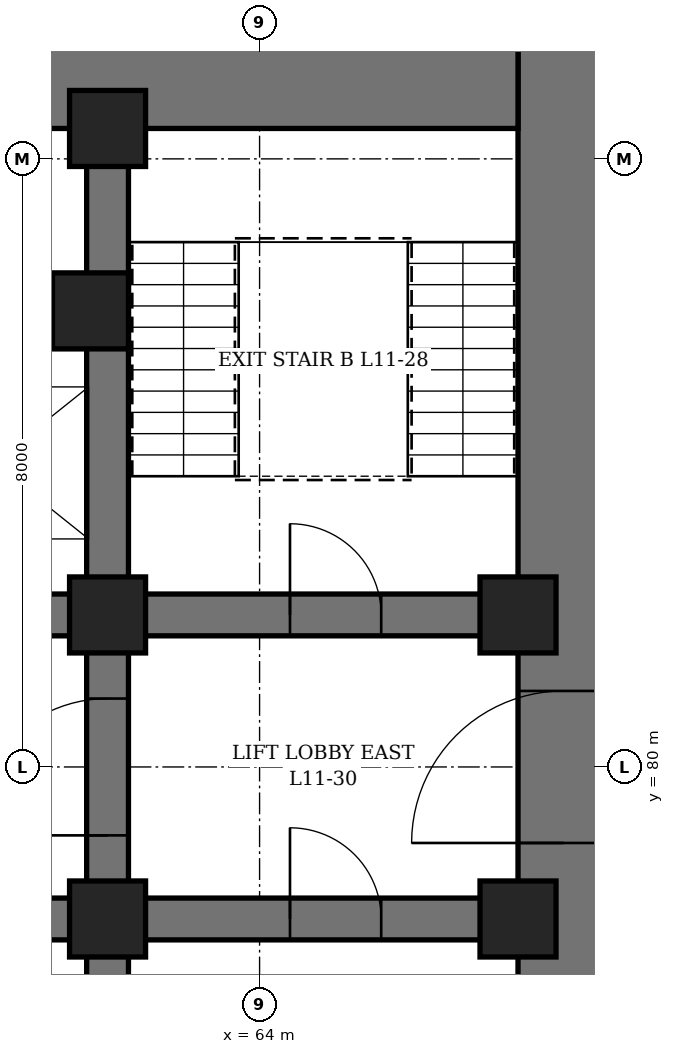
"""IFC4 building model, lengths in metres.
Left out: names, types, materials, properties, quantities, classifications, styles, units other than length and angle.
Written with IfcOpenShell. Run it as: python <this file> out.ifc"""

import sys

from ifc_helpers import new_model, si_unit, direction, frame, frame_2d, origin, origin_2d, place, context, subcontext, project, spatial, rectangle, hollow_rectangle, extrude, element, fill, save


model = new_model("IFC4")
c1 = context("Model", 3, precision=1e-05, world=origin(), true_north=direction((0.0, 1.0)))
c2 = subcontext(c1, "Body", "Model", "MODEL_VIEW")
j1 = project(units=[si_unit("LENGTHUNIT", "METRE"), si_unit("PLANEANGLEUNIT", "RADIAN")], contexts=[c1])
p1 = place(None, origin())
s1 = spatial("IfcSite", under=j1, at=p1, CompositionType="ELEMENT")
p2 = place(p1, origin())
s2 = spatial("IfcBuilding", under=s1, at=p2, CompositionType="ELEMENT")
p3 = place(p2, frame((0.0, 0.0, 55.9)))
s3 = spatial("IfcBuildingStorey", under=s2, at=p3, CompositionType="ELEMENT", Elevation=55.9)
p4 = place(p3, frame((68.0, 70.4, 0.0), z_axis=(0.0, 0.0, 1.0), x_axis=(0.0, 1.0, 0.0)))
e1 = element("IfcWall", 1, at=p4, inside=s3, PredefinedType="SHEAR", context=c2, shape_type="SweptSolid", body=[
    extrude(rectangle(XDim=19.2, YDim=1.2, at=frame_2d((9.6, 0.0))), origin(), (0.0, 0.0, 1.0), 4.2),
])
p5 = place(p4, frame((8.6, 0.0, 0.0)))
e2 = element("IfcOpeningElement", 2, at=p5, cuts=e1, PredefinedType="OPENING", context=c2, shape_type="SweptSolid", body=[
    extrude(rectangle(XDim=2.0, YDim=2.4, at=frame_2d((1.0, 1.2))), frame((0.0, 0.61, 0.0), z_axis=(0.0, -1.0, 0.0), x_axis=(1.0, 0.0, 0.0)), (0.0, 0.0, 1.0), 1.22),
])
p6 = place(p3, frame((44.6, 89.0, 0.0), z_axis=(0.0, 0.0, 1.0), x_axis=(1.0, 0.0, 0.0)))
e3 = element("IfcWall", 3, at=p6, inside=s3, PredefinedType="SHEAR", context=c2, shape_type="SweptSolid", body=[
    extrude(rectangle(XDim=22.8, YDim=1.2, at=frame_2d((11.4, 0.0))), origin(), (0.0, 0.0, 1.0), 4.2),
])
p7 = place(p6, frame((6.575, 0.0, 0.0)))
e4 = element("IfcOpeningElement", 4, at=p7, cuts=e3, PredefinedType="OPENING", context=c2, shape_type="SweptSolid", body=[
    extrude(rectangle(XDim=1.0, YDim=2.1, at=frame_2d((0.5, 1.05))), frame((0.0, 0.61, 0.0), z_axis=(0.0, -1.0, 0.0), x_axis=(1.0, 0.0, 0.0)), (0.0, 0.0, 1.0), 1.22),
])
p8 = place(p6, frame((9.45, 0.0, 0.0)))
e5 = element("IfcOpeningElement", 5, at=p8, cuts=e3, PredefinedType="OPENING", context=c2, shape_type="SweptSolid", body=[
    extrude(rectangle(XDim=0.9, YDim=2.1, at=frame_2d((0.45, 1.05))), frame((0.0, 0.61, 0.0), z_axis=(0.0, -1.0, 0.0), x_axis=(1.0, 0.0, 0.0)), (0.0, 0.0, 1.0), 1.22),
])
p9 = place(p6, frame((13.038, 0.0, 0.0)))
e6 = element("IfcOpeningElement", 6, at=p9, cuts=e3, PredefinedType="OPENING", context=c2, shape_type="SweptSolid", body=[
    extrude(rectangle(XDim=0.9, YDim=2.1, at=frame_2d((0.45, 1.05))), frame((0.0, 0.61, 0.0), z_axis=(0.0, -1.0, 0.0), x_axis=(1.0, 0.0, 0.0)), (0.0, 0.0, 1.0), 1.22),
])
p10 = place(p3, frame((62.0, 71.6, 0.0), z_axis=(0.0, 0.0, 1.0), x_axis=(0.0, 1.0, 0.0)))
e7 = element("IfcWall", 7, at=p10, inside=s3, PredefinedType="SHEAR", context=c2, shape_type="SweptSolid", body=[
    extrude(rectangle(XDim=16.8, YDim=0.55, at=frame_2d((8.4, 0.0))), origin(), (0.0, 0.0, 1.0), 4.2),
])
p11 = place(p10, frame((7.5, 0.0, 0.0)))
e8 = element("IfcOpeningElement", 8, at=p11, cuts=e7, PredefinedType="OPENING", context=c2, shape_type="SweptSolid", body=[
    extrude(rectangle(XDim=1.8, YDim=2.4, at=frame_2d((0.9, 1.2))), frame((0.0, 0.285, 0.0), z_axis=(0.0, -1.0, 0.0), x_axis=(1.0, 0.0, 0.0)), (0.0, 0.0, 1.0), 0.57),
])
p12 = place(p3, frame((62.275, 78.0, 0.0), z_axis=(0.0, 0.0, 1.0), x_axis=(1.0, 0.0, 0.0)))
e9 = element("IfcWall", 9, at=p12, inside=s3, PredefinedType="SHEAR", context=c2, shape_type="SweptSolid", body=[
    extrude(rectangle(XDim=5.125, YDim=0.55, at=frame_2d((2.562, 0.0))), origin(), (0.0, 0.0, 1.0), 4.2),
])
p13 = place(p12, frame((2.125, 0.0, 0.0)))
e10 = element("IfcOpeningElement", 10, at=p13, cuts=e9, PredefinedType="OPENING", context=c2, shape_type="SweptSolid", body=[
    extrude(rectangle(XDim=1.2, YDim=2.1, at=frame_2d((0.6, 1.05))), frame((0.0, 0.285, 0.0), z_axis=(0.0, -1.0, 0.0), x_axis=(1.0, 0.0, 0.0)), (0.0, 0.0, 1.0), 0.57),
])
p14 = place(p3, frame((62.275, 82.0, 0.0), z_axis=(0.0, 0.0, 1.0), x_axis=(1.0, 0.0, 0.0)))
e11 = element("IfcWall", 11, at=p14, inside=s3, PredefinedType="SHEAR", context=c2, shape_type="SweptSolid", body=[
    extrude(rectangle(XDim=5.125, YDim=0.55, at=frame_2d((2.562, 0.0))), origin(), (0.0, 0.0, 1.0), 4.2),
])
p15 = place(p14, frame((2.125, 0.0, 0.0)))
e12 = element("IfcOpeningElement", 12, at=p15, cuts=e11, PredefinedType="OPENING", context=c2, shape_type="SweptSolid", body=[
    extrude(rectangle(XDim=1.2, YDim=2.1, at=frame_2d((0.6, 1.05))), frame((0.0, 0.285, 0.0), z_axis=(0.0, -1.0, 0.0), x_axis=(1.0, 0.0, 0.0)), (0.0, 0.0, 1.0), 0.57),
])
p16 = place(p3, frame((50.275, 78.0, 0.0), z_axis=(0.0, 0.0, 1.0), x_axis=(1.0, 0.0, 0.0)))
e13 = element("IfcWall", 13, at=p16, inside=s3, PredefinedType="SHEAR", context=c2, shape_type="SweptSolid", body=[
    extrude(rectangle(XDim=11.45, YDim=0.55, at=frame_2d((5.725, 0.0))), origin(), (0.0, 0.0, 1.0), 4.2),
])
p17 = place(p16, frame((0.675, 0.0, 0.0)))
e14 = element("IfcOpeningElement", 14, at=p17, cuts=e13, PredefinedType="OPENING", context=c2, shape_type="SweptSolid", body=[
    extrude(rectangle(XDim=1.1, YDim=2.2, at=frame_2d((0.55, 1.1))), frame((0.0, 0.285, 0.0), z_axis=(0.0, -1.0, 0.0), x_axis=(1.0, 0.0, 0.0)), (0.0, 0.0, 1.0), 0.57),
])
p18 = place(p16, frame((3.675, 0.0, 0.0)))
e15 = element("IfcOpeningElement", 15, at=p18, cuts=e13, PredefinedType="OPENING", context=c2, shape_type="SweptSolid", body=[
    extrude(rectangle(XDim=1.1, YDim=2.2, at=frame_2d((0.55, 1.1))), frame((0.0, 0.285, 0.0), z_axis=(0.0, -1.0, 0.0), x_axis=(1.0, 0.0, 0.0)), (0.0, 0.0, 1.0), 0.57),
])
p19 = place(p16, frame((6.675, 0.0, 0.0)))
e16 = element("IfcOpeningElement", 16, at=p19, cuts=e13, PredefinedType="OPENING", context=c2, shape_type="SweptSolid", body=[
    extrude(rectangle(XDim=1.1, YDim=2.2, at=frame_2d((0.55, 1.1))), frame((0.0, 0.285, 0.0), z_axis=(0.0, -1.0, 0.0), x_axis=(1.0, 0.0, 0.0)), (0.0, 0.0, 1.0), 0.57),
])
p20 = place(p16, frame((9.675, 0.0, 0.0)))
e17 = element("IfcOpeningElement", 17, at=p20, cuts=e13, PredefinedType="OPENING", context=c2, shape_type="SweptSolid", body=[
    extrude(rectangle(XDim=1.1, YDim=2.2, at=frame_2d((0.55, 1.1))), frame((0.0, 0.285, 0.0), z_axis=(0.0, -1.0, 0.0), x_axis=(1.0, 0.0, 0.0)), (0.0, 0.0, 1.0), 0.57),
])
for number, where, z_axis, x_axis in (
    (18, (50.275, 82.0, 0.0), (0.0, 0.0, 1.0), (1.0, 0.0, 0.0)),
    (19, (50.275, 86.0, 0.0), (0.0, 0.0, 1.0), (1.0, 0.0, 0.0)),
):
    element("IfcWall", number, at=place(p3, frame(where, z_axis=z_axis, x_axis=x_axis)), inside=s3, PredefinedType="SHEAR", context=c2, shape_type="SweptSolid", body=[
        extrude(rectangle(XDim=11.45, YDim=0.55, at=frame_2d((5.725, 0.0))), origin(), (0.0, 0.0, 1.0), 4.2),
    ])
for number, where, z_axis, x_axis in (
    (20, (61.775, 86.0, 0.0), (0.0, 0.0, 1.0), (1.0, 0.0, 0.0)),
    (21, (62.0, 78.0, 0.0), (0.0, 0.0, 1.0), (1.0, 0.0, 0.0)),
    (22, (62.0, 82.0, 0.0), (0.0, 0.0, 1.0), (1.0, 0.0, 0.0)),
    (23, (62.0, 88.4, 0.0), (0.0, 0.0, 1.0), (1.0, 0.0, 0.0)),
    (24, (67.4, 78.0, 0.0), (0.0, 0.0, 1.0), (1.0, 0.0, 0.0)),
    (25, (67.4, 82.0, 0.0), (0.0, 0.0, 1.0), (1.0, 0.0, 0.0)),
):
    element("IfcColumn", number, at=place(p3, frame(where, z_axis=z_axis, x_axis=x_axis)), inside=s3, PredefinedType="COLUMN", context=c2, shape_type="SweptSolid", body=[
        extrude(hollow_rectangle(XDim=1.0, YDim=1.0, WallThickness=0.15, at=origin_2d()), origin(), (0.0, 0.0, 1.0), 4.2),
    ])
p21 = place(p15, origin())
e26 = element("IfcDoor", 26, at=p21, inside=s3, OperationType="SINGLE_SWING_LEFT", PredefinedType="DOOR", context=c2, shape_type="SweptSolid", body=[
    extrude(rectangle(XDim=1.2, YDim=2.1, at=frame_2d((0.6, 1.05))), frame((0.0, 0.275, 0.0), z_axis=(0.0, -1.0, 0.0), x_axis=(1.0, 0.0, 0.0)), (0.0, 0.0, 1.0), 0.55),
])
fill(e12, e26)
p22 = place(p5, origin())
e27 = element("IfcDoor", 27, at=p22, inside=s3, OperationType="DOUBLE_DOOR_SINGLE_SWING", PredefinedType="DOOR", context=c2, shape_type="SweptSolid", body=[
    extrude(rectangle(XDim=2.0, YDim=2.4, at=frame_2d((1.0, 1.2))), frame((0.0, 0.35, 0.0), z_axis=(0.0, -1.0, 0.0), x_axis=(1.0, 0.0, 0.0)), (0.0, 0.0, 1.0), 0.7),
])
fill(e2, e27)
p23 = place(p11, origin())
e28 = element("IfcDoor", 28, at=p23, inside=s3, OperationType="DOUBLE_DOOR_SINGLE_SWING", PredefinedType="DOOR", context=c2, shape_type="SweptSolid", body=[
    extrude(rectangle(XDim=1.8, YDim=2.4, at=frame_2d((0.9, 1.2))), frame((0.0, 0.275, 0.0), z_axis=(0.0, -1.0, 0.0), x_axis=(1.0, 0.0, 0.0)), (0.0, 0.0, 1.0), 0.55),
])
fill(e8, e28)
p24 = place(p13, origin())
e29 = element("IfcDoor", 29, at=p24, inside=s3, OperationType="SINGLE_SWING_RIGHT", PredefinedType="DOOR", context=c2, shape_type="SweptSolid", body=[
    extrude(rectangle(XDim=1.2, YDim=2.1, at=frame_2d((0.6, 1.05))), frame((0.0, 0.275, 0.0), z_axis=(0.0, -1.0, 0.0), x_axis=(1.0, 0.0, 0.0)), (0.0, 0.0, 1.0), 0.55),
])
fill(e10, e29)
save(model, sys.argv[1])
